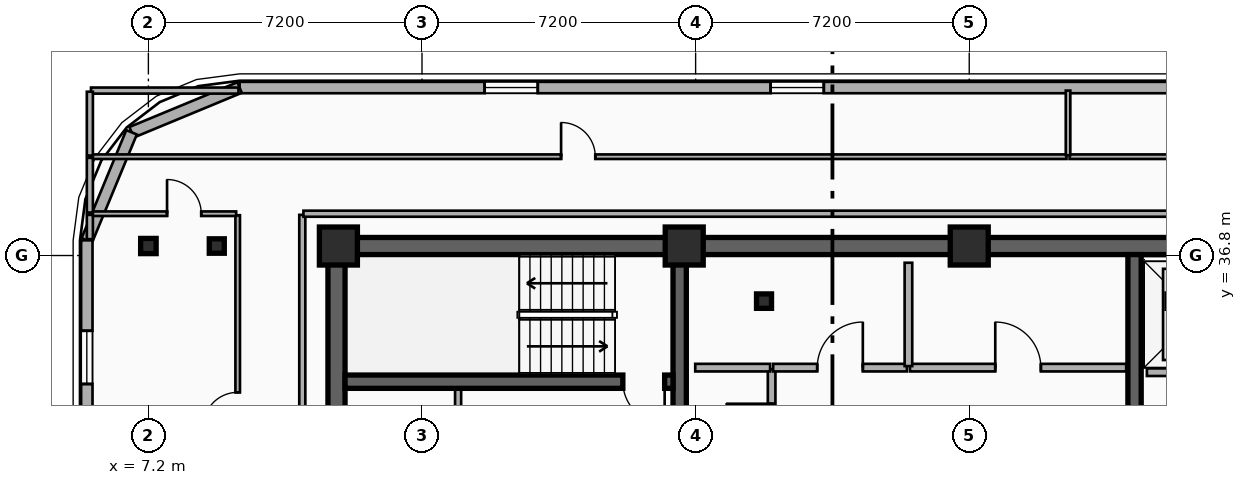
"""IFC4 building model, lengths in metres.
Left out: names, types, materials, properties, quantities, classifications, styles, units other than length and angle.
Written with IfcOpenShell. Run it as: python <this file> out.ifc"""

import sys

from ifc_helpers import new_model, si_unit, direction, frame, frame_2d, origin, origin_2d, place, context, subcontext, project, spatial, rectangle, i_section, extrude, element, fill, save


model = new_model("IFC4")
c1 = context("Model", 3, precision=1e-05, world=origin(), true_north=direction((0.0, 1.0)))
c2 = subcontext(c1, "Body", "Model", "MODEL_VIEW")
j1 = project(units=[si_unit("LENGTHUNIT", "METRE"), si_unit("PLANEANGLEUNIT", "RADIAN")], contexts=[c1])
p1 = place(None, origin())
s1 = spatial("IfcSite", under=j1, at=p1, CompositionType="ELEMENT")
p2 = place(p1, origin())
s2 = spatial("IfcBuilding", under=s1, at=p2, CompositionType="ELEMENT")
p3 = place(p2, frame((0.0, 0.0, 240.0)))
s3 = spatial("IfcBuildingStorey", under=s2, at=p3, CompositionType="ELEMENT", Elevation=240.0)
p4 = place(p3, frame((12.15, 37.05, 0.0), z_axis=(0.0, 0.0, 1.0), x_axis=(1.0, 0.0, 0.0)))
e1 = element("IfcWall", 1, at=p4, inside=s3, PredefinedType="SHEAR", context=c2, shape_type="SweptSolid", body=[
    extrude(rectangle(XDim=33.23, YDim=0.45, at=frame_2d((16.615, 0.0))), origin(), (0.0, 0.0, 1.0), 3.6),
])
p5 = place(p3, frame((12.15, 28.045, 0.0), z_axis=(0.0, 0.0, 1.0), x_axis=(0.0, 1.0, 0.0)))
e2 = element("IfcWall", 2, at=p5, inside=s3, PredefinedType="SHEAR", context=c2, shape_type="SweptSolid", body=[
    extrude(rectangle(XDim=8.78, YDim=0.45, at=frame_2d((4.39, 0.0))), origin(), (0.0, 0.0, 1.0), 3.6),
])
for number, where, z_axis, x_axis in (
    (3, (21.18, 28.045, 0.0), (0.0, 0.0, 1.0), (0.0, 1.0, 0.0)),
    (4, (33.15, 28.045, 0.0), (0.0, 0.0, 1.0), (0.0, 1.0, 0.0)),
):
    element("IfcWall", number, at=place(p3, frame(where, z_axis=z_axis, x_axis=x_axis)), inside=s3, PredefinedType="SHEAR", context=c2, shape_type="SweptSolid", body=[
        extrude(rectangle(XDim=8.78, YDim=0.35, at=frame_2d((4.39, 0.0))), origin(), (0.0, 0.0, 1.0), 3.6),
    ])
p6 = place(p3, frame((21.005, 33.48, 0.0), z_axis=(0.0, 0.0, 1.0), x_axis=(-1.0, 0.0, 0.0)))
e5 = element("IfcWall", 5, at=p6, inside=s3, PredefinedType="SHEAR", context=c2, shape_type="SweptSolid", body=[
    extrude(rectangle(XDim=8.63, YDim=0.35, at=frame_2d((4.315, 0.0))), origin(), (0.0, 0.0, 1.0), 3.6),
])
p7 = place(p6, frame((0.22, 0.0, 0.0)))
e6 = element("IfcOpeningElement", 6, at=p7, cuts=e5, PredefinedType="OPENING", context=c2, shape_type="SweptSolid", body=[
    extrude(rectangle(XDim=1.1, YDim=2.15, at=frame_2d((0.55, 1.075))), frame((0.0, 0.185, 0.0), z_axis=(0.0, -1.0, 0.0), x_axis=(1.0, 0.0, 0.0)), (0.0, 0.0, 1.0), 0.37),
])
p8 = place(p3, frame((23.4, 35.6, 0.0), z_axis=(0.0, 0.0, 1.0), x_axis=(1.0, 0.0, 0.0)))
e7 = element("IfcColumn", 7, at=p8, inside=s3, PredefinedType="COLUMN", context=c2, shape_type="SweptSolid", body=[
    extrude(i_section(OverallWidth=0.395, OverallDepth=0.38, WebThickness=0.019, FlangeThickness=0.03, FilletRadius=0.015, at=origin_2d()), origin(), (0.0, 0.0, 1.0), 3.6),
])
for number, where, z_axis, x_axis in (
    (8, (12.2, 37.05, 0.0), (0.0, 0.0, 1.0), (1.0, 0.0, 0.0)),
    (9, (21.3, 37.05, 0.0), (0.0, 0.0, 1.0), (1.0, 0.0, 0.0)),
    (10, (28.8, 37.05, 0.0), (0.0, 0.0, 1.0), (1.0, 0.0, 0.0)),
):
    element("IfcColumn", number, at=place(p3, frame(where, z_axis=z_axis, x_axis=x_axis)), inside=s3, PredefinedType="COLUMN", context=c2, shape_type="SweptSolid", body=[
        extrude(rectangle(XDim=1.0, YDim=1.0, at=origin_2d()), origin(), (0.0, 0.0, 1.0), 3.6),
    ])
p9 = place(p3, frame((9.0, 37.05, 0.0), z_axis=(0.0, 0.0, 1.0), x_axis=(1.0, 0.0, 0.0)))
e11 = element("IfcColumn", 11, at=p9, inside=s3, PredefinedType="COLUMN", context=c2, shape_type="SweptSolid", body=[
    extrude(i_section(OverallWidth=0.395, OverallDepth=0.38, WebThickness=0.019, FlangeThickness=0.03, FilletRadius=0.015, at=origin_2d()), origin(), (0.0, 0.0, 1.0), 3.6),
])
p10 = place(p3, frame((7.2, 37.05, 0.0), z_axis=(0.0, 0.0, 1.0), x_axis=(1.0, 0.0, 0.0)))
e12 = element("IfcColumn", 12, at=p10, inside=s3, PredefinedType="COLUMN", context=c2, shape_type="SweptSolid", body=[
    extrude(i_section(OverallWidth=0.408, OverallDepth=0.4, WebThickness=0.025, FlangeThickness=0.039, FilletRadius=0.015, at=origin_2d()), origin(), (0.0, 0.0, 1.0), 3.6),
])
p11 = place(p3, frame((9.6, 41.22, 0.0), z_axis=(0.0, 0.0, 1.0), x_axis=(1.0, 0.0, 0.0)))
e13 = element("IfcWall", 13, at=p11, inside=s3, PredefinedType="SOLIDWALL", context=c2, shape_type="SweptSolid", body=[
    extrude(rectangle(XDim=38.4, YDim=0.3, at=frame_2d((19.2, 0.0))), origin(), (0.0, 0.0, 1.0), 3.28),
])
p12 = place(p11, frame((6.447, 0.0, 0.75)))
e14 = element("IfcOpeningElement", 14, at=p12, cuts=e13, PredefinedType="OPENING", context=c2, shape_type="SweptSolid", body=[
    extrude(rectangle(XDim=1.4, YDim=2.1, at=frame_2d((0.7, 1.05))), frame((0.0, 0.16, 0.0), z_axis=(0.0, -1.0, 0.0), x_axis=(1.0, 0.0, 0.0)), (0.0, 0.0, 1.0), 0.32),
])
p13 = place(p11, frame((13.973, 0.0, 0.75)))
e15 = element("IfcOpeningElement", 15, at=p13, cuts=e13, PredefinedType="OPENING", context=c2, shape_type="SweptSolid", body=[
    extrude(rectangle(XDim=1.4, YDim=2.1, at=frame_2d((0.7, 1.05))), frame((0.0, 0.16, 0.0), z_axis=(0.0, -1.0, 0.0), x_axis=(1.0, 0.0, 0.0)), (0.0, 0.0, 1.0), 0.32),
])
p14 = place(p11, frame((26.493, 0.0, 0.75)))
e16 = element("IfcOpeningElement", 16, at=p14, cuts=e13, PredefinedType="OPENING", context=c2, shape_type="SweptSolid", body=[
    extrude(rectangle(XDim=1.4, YDim=2.1, at=frame_2d((0.7, 1.05))), frame((0.0, 0.16, 0.0), z_axis=(0.0, -1.0, 0.0), x_axis=(1.0, 0.0, 0.0)), (0.0, 0.0, 1.0), 0.32),
])
p15 = place(p11, frame((32.287, 0.0, 0.75)))
e17 = element("IfcOpeningElement", 17, at=p15, cuts=e13, PredefinedType="OPENING", context=c2, shape_type="SweptSolid", body=[
    extrude(rectangle(XDim=1.4, YDim=2.1, at=frame_2d((0.7, 1.05))), frame((0.0, 0.16, 0.0), z_axis=(0.0, -1.0, 0.0), x_axis=(1.0, 0.0, 0.0)), (0.0, 0.0, 1.0), 0.32),
])
p16 = place(p3, frame((6.757, 40.042, 0.0), z_axis=(0.0, 0.0, 1.0), x_axis=(0.923882414032, 0.382676475685, 0.0)))
e18 = element("IfcWall", 18, at=p16, inside=s3, PredefinedType="SOLIDWALL", context=c2, shape_type="SweptSolid", body=[
    extrude(rectangle(XDim=3.077, YDim=0.3, at=frame_2d((1.539, 0.0))), origin(), (0.0, 0.0, 1.0), 3.28),
])
p17 = place(p3, frame((5.58, 37.2, 0.0), z_axis=(0.0, 0.0, 1.0), x_axis=(0.382636798336, 0.92389884758, 0.0)))
e19 = element("IfcWall", 19, at=p17, inside=s3, PredefinedType="SOLIDWALL", context=c2, shape_type="SweptSolid", body=[
    extrude(rectangle(XDim=3.077, YDim=0.3, at=frame_2d((1.538, 0.0))), origin(), (0.0, 0.0, 1.0), 3.28),
])
p18 = place(p3, frame((5.58, 8.6, 0.0), z_axis=(0.0, 0.0, 1.0), x_axis=(0.0, 1.0, 0.0)))
e20 = element("IfcWall", 20, at=p18, inside=s3, PredefinedType="SOLIDWALL", context=c2, shape_type="SweptSolid", body=[
    extrude(rectangle(XDim=28.6, YDim=0.3, at=frame_2d((14.3, 0.0))), origin(), (0.0, 0.0, 1.0), 3.28),
])
p19 = place(p18, frame((21.36, 0.0, 0.34)))
e21 = element("IfcOpeningElement", 21, at=p19, cuts=e20, PredefinedType="OPENING", context=c2, shape_type="SweptSolid", body=[
    extrude(rectangle(XDim=1.4, YDim=2.1, at=frame_2d((0.7, 1.05))), frame((0.0, 0.16, 0.0), z_axis=(0.0, -1.0, 0.0), x_axis=(1.0, 0.0, 0.0)), (0.0, 0.0, 1.0), 0.32),
])
p20 = place(p18, frame((24.82, 0.0, 0.34)))
e22 = element("IfcOpeningElement", 22, at=p20, cuts=e20, PredefinedType="OPENING", context=c2, shape_type="SweptSolid", body=[
    extrude(rectangle(XDim=1.4, YDim=2.1, at=frame_2d((0.7, 1.05))), frame((0.0, 0.16, 0.0), z_axis=(0.0, -1.0, 0.0), x_axis=(1.0, 0.0, 0.0)), (0.0, 0.0, 1.0), 0.32),
])
p21 = place(p18, frame((4.797, 0.0, 0.34)))
e23 = element("IfcOpeningElement", 23, at=p21, cuts=e20, PredefinedType="OPENING", context=c2, shape_type="SweptSolid", body=[
    extrude(rectangle(XDim=1.4, YDim=2.1, at=frame_2d((0.7, 1.05))), frame((0.0, 0.16, 0.0), z_axis=(0.0, -1.0, 0.0), x_axis=(1.0, 0.0, 0.0)), (0.0, 0.0, 1.0), 0.32),
])
p22 = place(p18, frame((10.673, 0.0, 0.34)))
e24 = element("IfcOpeningElement", 24, at=p22, cuts=e20, PredefinedType="OPENING", context=c2, shape_type="SweptSolid", body=[
    extrude(rectangle(XDim=1.4, YDim=2.1, at=frame_2d((0.7, 1.05))), frame((0.0, 0.16, 0.0), z_axis=(0.0, -1.0, 0.0), x_axis=(1.0, 0.0, 0.0)), (0.0, 0.0, 1.0), 0.32),
])
p23 = place(p3, frame((33.475, 33.73, 0.0), z_axis=(0.0, 0.0, 1.0), x_axis=(1.0, 0.0, 0.0)))
e25 = element("IfcWall", 25, at=p23, inside=s3, PredefinedType="PARTITIONING", context=c2, shape_type="SweptSolid", body=[
    extrude(rectangle(XDim=2.725, YDim=0.2, at=frame_2d((1.362, 0.0))), origin(), (0.0, 0.0, 1.0), 2.35),
])
p24 = place(p23, frame((0.812, 0.0, 0.0)))
e26 = element("IfcOpeningElement", 26, at=p24, cuts=e25, PredefinedType="OPENING", context=c2, shape_type="SweptSolid", body=[
    extrude(rectangle(XDim=1.1, YDim=2.15, at=frame_2d((0.55, 1.075))), frame((0.0, 0.11, 0.0), z_axis=(0.0, -1.0, 0.0), x_axis=(1.0, 0.0, 0.0)), (0.0, 0.0, 1.0), 0.22),
])
p25 = place(p3, frame((23.6, 30.79, 0.0), z_axis=(0.0, 0.0, 1.0), x_axis=(0.0, 1.0, 0.0)))
e27 = element("IfcWall", 27, at=p25, inside=s3, PredefinedType="PARTITIONING", context=c2, shape_type="SweptSolid", body=[
    extrude(rectangle(XDim=3.02, YDim=0.2, at=frame_2d((1.51, 0.0))), origin(), (0.0, 0.0, 1.0), 3.28),
])
p26 = place(p25, frame((0.91, 0.0, 0.0)))
e28 = element("IfcOpeningElement", 28, at=p26, cuts=e27, PredefinedType="OPENING", context=c2, shape_type="SweptSolid", body=[
    extrude(rectangle(XDim=1.2, YDim=2.15, at=frame_2d((0.6, 1.075))), frame((0.0, 0.11, 0.0), z_axis=(0.0, -1.0, 0.0), x_axis=(1.0, 0.0, 0.0)), (0.0, 0.0, 1.0), 0.22),
])
p27 = place(p3, frame((23.64, 33.85, 0.0), z_axis=(0.0, 0.0, 1.0), x_axis=(1.0, 0.0, 0.0)))
e29 = element("IfcWall", 29, at=p27, inside=s3, PredefinedType="PARTITIONING", context=c2, shape_type="SweptSolid", body=[
    extrude(rectangle(XDim=3.52, YDim=0.2, at=frame_2d((1.76, 0.0))), origin(), (0.0, 0.0, 1.0), 3.28),
])
p28 = place(p27, frame((1.16, 0.0, 0.0)))
e30 = element("IfcOpeningElement", 30, at=p28, cuts=e29, PredefinedType="OPENING", context=c2, shape_type="SweptSolid", body=[
    extrude(rectangle(XDim=1.2, YDim=2.15, at=frame_2d((0.6, 1.075))), frame((0.0, 0.11, 0.0), z_axis=(0.0, -1.0, 0.0), x_axis=(1.0, 0.0, 0.0)), (0.0, 0.0, 1.0), 0.22),
])
p29 = place(p3, frame((27.24, 33.85, 0.0), z_axis=(0.0, 0.0, 1.0), x_axis=(1.0, 0.0, 0.0)))
e31 = element("IfcWall", 31, at=p29, inside=s3, PredefinedType="PARTITIONING", context=c2, shape_type="SweptSolid", body=[
    extrude(rectangle(XDim=5.69, YDim=0.2, at=frame_2d((2.845, 0.0))), origin(), (0.0, 0.0, 1.0), 2.35),
])
p30 = place(p29, frame((2.245, 0.0, 0.0)))
e32 = element("IfcOpeningElement", 32, at=p30, cuts=e31, PredefinedType="OPENING", context=c2, shape_type="SweptSolid", body=[
    extrude(rectangle(XDim=1.2, YDim=2.15, at=frame_2d((0.6, 1.075))), frame((0.0, 0.11, 0.0), z_axis=(0.0, -1.0, 0.0), x_axis=(1.0, 0.0, 0.0)), (0.0, 0.0, 1.0), 0.22),
])
p31 = place(p3, frame((21.59, 33.85, 0.0), z_axis=(0.0, 0.0, 1.0), x_axis=(1.0, 0.0, 0.0)))
e33 = element("IfcWall", 33, at=p31, inside=s3, PredefinedType="PARTITIONING", context=c2, shape_type="SweptSolid", body=[
    extrude(rectangle(XDim=1.97, YDim=0.2, at=frame_2d((0.985, 0.0))), origin(), (0.0, 0.0, 1.0), 2.35),
])
p32 = place(p3, frame((27.2, 33.89, 0.0), z_axis=(0.0, 0.0, 1.0), x_axis=(0.0, 1.0, 0.0)))
e34 = element("IfcWall", 34, at=p32, inside=s3, PredefinedType="PARTITIONING", context=c2, shape_type="SweptSolid", body=[
    extrude(rectangle(XDim=2.72, YDim=0.2, at=frame_2d((1.36, 0.0))), origin(), (0.0, 0.0, 1.0), 3.28),
])
p33 = place(p3, frame((9.55, 27.64, 0.0), z_axis=(0.0, 0.0, 1.0), x_axis=(0.0, 1.0, 0.0)))
e35 = element("IfcWall", 35, at=p33, inside=s3, PredefinedType="PARTITIONING", context=c2, shape_type="SweptSolid", body=[
    extrude(rectangle(XDim=10.22, YDim=0.12, at=frame_2d((5.11, 0.0))), origin(), (0.0, 0.0, 1.0), 2.76),
])
p34 = place(p33, frame((4.66, 0.0, 0.0)))
e36 = element("IfcOpeningElement", 36, at=p34, cuts=e35, PredefinedType="OPENING", context=c2, shape_type="SweptSolid", body=[
    extrude(rectangle(XDim=0.9, YDim=2.1, at=frame_2d((0.45, 1.05))), frame((0.0, 0.07, 0.0), z_axis=(0.0, -1.0, 0.0), x_axis=(1.0, 0.0, 0.0)), (0.0, 0.0, 1.0), 0.14),
])
p35 = place(p3, frame((5.66, 37.9, 0.0), z_axis=(0.0, 0.0, 1.0), x_axis=(1.0, 0.0, 0.0)))
e37 = element("IfcWall", 37, at=p35, inside=s3, PredefinedType="PARTITIONING", context=c2, shape_type="SweptSolid", body=[
    extrude(rectangle(XDim=3.85, YDim=0.12, at=frame_2d((1.925, 0.0))), origin(), (0.0, 0.0, 1.0), 3.28),
])
p36 = place(p35, frame((2.031, 0.0, 0.0)))
e38 = element("IfcOpeningElement", 38, at=p36, cuts=e37, PredefinedType="OPENING", context=c2, shape_type="SweptSolid", body=[
    extrude(rectangle(XDim=0.9, YDim=2.1, at=frame_2d((0.45, 1.05))), frame((0.0, 0.07, 0.0), z_axis=(0.0, -1.0, 0.0), x_axis=(1.0, 0.0, 0.0)), (0.0, 0.0, 1.0), 0.14),
])
p37 = place(p3, frame((5.66, 39.4, 0.0), z_axis=(0.0, 0.0, 1.0), x_axis=(1.0, 0.0, 0.0)))
e39 = element("IfcWall", 39, at=p37, inside=s3, PredefinedType="PARTITIONING", context=c2, shape_type="SweptSolid", body=[
    extrude(rectangle(XDim=25.7, YDim=0.12, at=frame_2d((12.85, 0.0))), origin(), (0.0, 0.0, 1.0), 3.28),
])
p38 = place(p37, frame((12.4, 0.0, 0.0)))
e40 = element("IfcOpeningElement", 40, at=p38, cuts=e39, PredefinedType="OPENING", context=c2, shape_type="SweptSolid", body=[
    extrude(rectangle(XDim=0.9, YDim=2.1, at=frame_2d((0.45, 1.05))), frame((0.0, 0.07, 0.0), z_axis=(0.0, -1.0, 0.0), x_axis=(1.0, 0.0, 0.0)), (0.0, 0.0, 1.0), 0.14),
])
p39 = place(p3, frame((31.44, 39.4, 0.0), z_axis=(0.0, 0.0, 1.0), x_axis=(1.0, 0.0, 0.0)))
e41 = element("IfcWall", 41, at=p39, inside=s3, PredefinedType="PARTITIONING", context=c2, shape_type="SweptSolid", body=[
    extrude(rectangle(XDim=20.5, YDim=0.12, at=frame_2d((10.25, 0.0))), origin(), (0.0, 0.0, 1.0), 3.28),
])
p40 = place(p39, frame((9.8, 0.0, 0.0)))
e42 = element("IfcOpeningElement", 42, at=p40, cuts=e41, PredefinedType="OPENING", context=c2, shape_type="SweptSolid", body=[
    extrude(rectangle(XDim=0.9, YDim=2.1, at=frame_2d((0.45, 1.05))), frame((0.0, 0.07, 0.0), z_axis=(0.0, -1.0, 0.0), x_axis=(1.0, 0.0, 0.0)), (0.0, 0.0, 1.0), 0.14),
])
p41 = place(p3, frame((31.4, 39.44, 0.0), z_axis=(0.0, 0.0, 1.0), x_axis=(0.0, 1.0, 0.0)))
e43 = element("IfcWall", 43, at=p41, inside=s3, PredefinedType="PARTITIONING", context=c2, shape_type="SweptSolid", body=[
    extrude(rectangle(XDim=1.7, YDim=0.12, at=frame_2d((0.85, 0.0))), origin(), (0.0, 0.0, 1.0), 3.28),
])
p42 = place(p3, frame((15.35, 30.96, 0.0), z_axis=(0.0, 0.0, 1.0), x_axis=(0.0, 1.0, 0.0)))
e44 = element("IfcWall", 44, at=p42, inside=s3, PredefinedType="PARTITIONING", context=c2, shape_type="SweptSolid", body=[
    extrude(rectangle(XDim=2.31, YDim=0.16, at=frame_2d((1.155, 0.0))), origin(), (0.0, 0.0, 1.0), 3.28),
])
p43 = place(p3, frame((11.25, 27.63, 0.0), z_axis=(0.0, 0.0, 1.0), x_axis=(0.0, 1.0, 0.0)))
e45 = element("IfcWall", 45, at=p43, inside=s3, PredefinedType="PARTITIONING", context=c2, shape_type="SweptSolid", body=[
    extrude(rectangle(XDim=10.24, YDim=0.16, at=frame_2d((5.12, 0.0))), origin(), (0.0, 0.0, 1.0), 2.76),
])
p44 = place(p3, frame((11.28, 37.9, 0.0), z_axis=(0.0, 0.0, 1.0), x_axis=(1.0, 0.0, 0.0)))
e46 = element("IfcWall", 46, at=p44, inside=s3, PredefinedType="PARTITIONING", context=c2, shape_type="SweptSolid", body=[
    extrude(rectangle(XDim=35.04, YDim=0.16, at=frame_2d((17.52, 0.0))), origin(), (0.0, 0.0, 1.0), 3.28),
])
p45 = place(p3, frame((5.66, 37.93, 0.0), z_axis=(0.0, 0.0, 1.0), x_axis=(0.0, 1.0, 0.0)))
e47 = element("IfcWall", 47, at=p45, inside=s3, PredefinedType="PARTITIONING", context=c2, shape_type="SweptSolid", body=[
    extrude(rectangle(XDim=1.44, YDim=0.16, at=frame_2d((0.72, 0.0))), origin(), (0.0, 0.0, 1.0), 3.28),
])
p46 = place(p3, frame((5.66, 37.23, 0.0), z_axis=(0.0, 0.0, 1.0), x_axis=(0.0, 1.0, 0.0)))
e48 = element("IfcWall", 48, at=p46, inside=s3, PredefinedType="PARTITIONING", context=c2, shape_type="SweptSolid", body=[
    extrude(rectangle(XDim=0.64, YDim=0.16, at=frame_2d((0.32, 0.0))), origin(), (0.0, 0.0, 1.0), 3.28),
])
p47 = place(p3, frame((5.69, 41.14, 0.0), z_axis=(0.0, 0.0, 1.0), x_axis=(1.0, 0.0, 0.0)))
e49 = element("IfcWall", 49, at=p47, inside=s3, PredefinedType="PARTITIONING", context=c2, shape_type="SweptSolid", body=[
    extrude(rectangle(XDim=3.88, YDim=0.16, at=frame_2d((1.94, 0.0))), origin(), (0.0, 0.0, 1.0), 3.28),
])
p48 = place(p3, frame((5.66, 39.43, 0.0), z_axis=(0.0, 0.0, 1.0), x_axis=(0.0, 1.0, 0.0)))
e50 = element("IfcWall", 50, at=p48, inside=s3, PredefinedType="PARTITIONING", context=c2, shape_type="SweptSolid", body=[
    extrude(rectangle(XDim=1.68, YDim=0.16, at=frame_2d((0.84, 0.0))), origin(), (0.0, 0.0, 1.0), 3.28),
])
p49 = place(p12, origin())
e51 = element("IfcWindow", 51, at=p49, inside=s3, PartitioningType="SINGLE_PANEL", PredefinedType="WINDOW", context=c2, shape_type="SweptSolid", body=[
    extrude(rectangle(XDim=1.4, YDim=2.1, at=frame_2d((0.7, 1.05))), frame((0.0, 0.03, 0.0), z_axis=(0.0, -1.0, 0.0), x_axis=(1.0, 0.0, 0.0)), (0.0, 0.0, 1.0), 0.06),
])
fill(e14, e51)
p50 = place(p13, origin())
e52 = element("IfcWindow", 52, at=p50, inside=s3, PartitioningType="SINGLE_PANEL", PredefinedType="WINDOW", context=c2, shape_type="SweptSolid", body=[
    extrude(rectangle(XDim=1.4, YDim=2.1, at=frame_2d((0.7, 1.05))), frame((0.0, 0.03, 0.0), z_axis=(0.0, -1.0, 0.0), x_axis=(1.0, 0.0, 0.0)), (0.0, 0.0, 1.0), 0.06),
])
fill(e15, e52)
p51 = place(p20, origin())
e53 = element("IfcWindow", 53, at=p51, inside=s3, PartitioningType="SINGLE_PANEL", PredefinedType="WINDOW", context=c2, shape_type="SweptSolid", body=[
    extrude(rectangle(XDim=1.4, YDim=2.1, at=frame_2d((0.7, 1.05))), frame((0.0, 0.03, 0.0), z_axis=(0.0, -1.0, 0.0), x_axis=(1.0, 0.0, 0.0)), (0.0, 0.0, 1.0), 0.06),
])
fill(e22, e53)
p52 = place(p7, origin())
e54 = element("IfcDoor", 54, at=p52, inside=s3, OperationType="SINGLE_SWING_LEFT", PredefinedType="DOOR", context=c2, shape_type="SweptSolid", body=[
    extrude(rectangle(XDim=1.1, YDim=2.15, at=frame_2d((0.55, 1.075))), frame((0.0, 0.025, 0.0), z_axis=(0.0, -1.0, 0.0), x_axis=(1.0, 0.0, 0.0)), (0.0, 0.0, 1.0), 0.05),
])
fill(e6, e54)
p53 = place(p26, origin())
e55 = element("IfcDoor", 55, at=p53, inside=s3, OperationType="SINGLE_SWING_RIGHT", PredefinedType="DOOR", context=c2, shape_type="SweptSolid", body=[
    extrude(rectangle(XDim=1.2, YDim=2.15, at=frame_2d((0.6, 1.075))), frame((0.0, 0.025, 0.0), z_axis=(0.0, -1.0, 0.0), x_axis=(1.0, 0.0, 0.0)), (0.0, 0.0, 1.0), 0.05),
])
fill(e28, e55)
p54 = place(p28, origin())
e56 = element("IfcDoor", 56, at=p54, inside=s3, OperationType="SINGLE_SWING_RIGHT", PredefinedType="DOOR", context=c2, shape_type="SweptSolid", body=[
    extrude(rectangle(XDim=1.2, YDim=2.15, at=frame_2d((0.6, 1.075))), frame((0.0, 0.025, 0.0), z_axis=(0.0, -1.0, 0.0), x_axis=(1.0, 0.0, 0.0)), (0.0, 0.0, 1.0), 0.05),
])
fill(e30, e56)
p55 = place(p30, origin())
e57 = element("IfcDoor", 57, at=p55, inside=s3, OperationType="SINGLE_SWING_LEFT", PredefinedType="DOOR", context=c2, shape_type="SweptSolid", body=[
    extrude(rectangle(XDim=1.2, YDim=2.15, at=frame_2d((0.6, 1.075))), frame((0.0, 0.025, 0.0), z_axis=(0.0, -1.0, 0.0), x_axis=(1.0, 0.0, 0.0)), (0.0, 0.0, 1.0), 0.05),
])
fill(e32, e57)
p56 = place(p34, origin())
e58 = element("IfcDoor", 58, at=p56, inside=s3, OperationType="SINGLE_SWING_LEFT", PredefinedType="DOOR", context=c2, shape_type="SweptSolid", body=[
    extrude(rectangle(XDim=0.9, YDim=2.1, at=frame_2d((0.45, 1.05))), frame((0.0, 0.025, 0.0), z_axis=(0.0, -1.0, 0.0), x_axis=(1.0, 0.0, 0.0)), (0.0, 0.0, 1.0), 0.05),
])
fill(e36, e58)
p57 = place(p36, origin())
e59 = element("IfcDoor", 59, at=p57, inside=s3, OperationType="SINGLE_SWING_LEFT", PredefinedType="DOOR", context=c2, shape_type="SweptSolid", body=[
    extrude(rectangle(XDim=0.9, YDim=2.1, at=frame_2d((0.45, 1.05))), frame((0.0, 0.025, 0.0), z_axis=(0.0, -1.0, 0.0), x_axis=(1.0, 0.0, 0.0)), (0.0, 0.0, 1.0), 0.05),
])
fill(e38, e59)
p58 = place(p38, origin())
e60 = element("IfcDoor", 60, at=p58, inside=s3, OperationType="SINGLE_SWING_LEFT", PredefinedType="DOOR", context=c2, shape_type="SweptSolid", body=[
    extrude(rectangle(XDim=0.9, YDim=2.1, at=frame_2d((0.45, 1.05))), frame((0.0, 0.025, 0.0), z_axis=(0.0, -1.0, 0.0), x_axis=(1.0, 0.0, 0.0)), (0.0, 0.0, 1.0), 0.05),
])
fill(e40, e60)
save(model, sys.argv[1])
